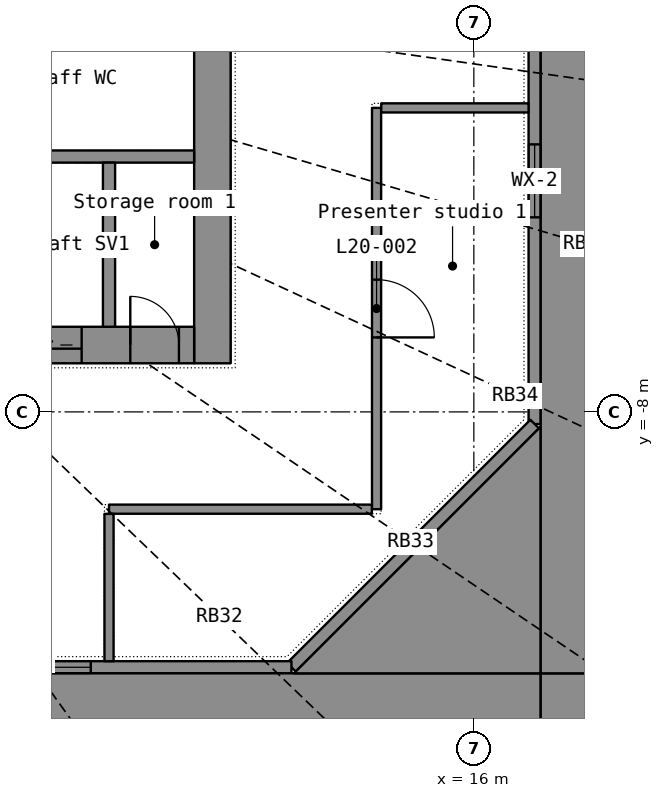
"""IFC4 building model, lengths in metres.
Left out: names, types, materials, properties, quantities, classifications, styles, units other than length and angle.
Written with IfcOpenShell. Run it as: python <this file> out.ifc"""

import sys

from ifc_helpers import new_model, si_unit, direction, frame, frame_2d, origin, place, context, subcontext, project, spatial, polyline, rectangle, outline, extrude, element, fill, save


model = new_model("IFC4")
c1 = context("Model", 3, precision=1e-05, world=origin(), true_north=direction((0.0, 1.0)))
c2 = subcontext(c1, "Body", "Model", "MODEL_VIEW")
j1 = project(units=[si_unit("LENGTHUNIT", "METRE"), si_unit("PLANEANGLEUNIT", "RADIAN")], contexts=[c1])
p1 = place(None, origin())
s1 = spatial("IfcSite", under=j1, at=p1, CompositionType="ELEMENT")
p2 = place(p1, origin())
s2 = spatial("IfcBuilding", under=s1, at=p2, CompositionType="ELEMENT")
p3 = place(p2, frame((0.0, 0.0, 85.2)))
s3 = spatial("IfcBuildingStorey", under=s2, at=p3, CompositionType="ELEMENT", Elevation=85.2)
p4 = place(p3, frame((17.0, 8.2, 0.08), z_axis=(0.0, 0.0, 1.0), x_axis=(0.0, -1.0, 0.0)))
e1 = element("IfcWall", 1, at=p4, inside=s3, PredefinedType="STANDARD", context=c2, shape_type="SweptSolid", body=[
    extrude(rectangle(XDim=16.4, YDim=0.2, at=frame_2d((8.2, 0.0))), origin(), (0.0, 0.0, 1.0), 7.12),
])
p5 = place(p4, frame((7.3, 0.0, 0.0)))
e2 = element("IfcOpeningElement", 2, at=p5, cuts=e1, PredefinedType="OPENING", context=c2, shape_type="SweptSolid", body=[
    extrude(rectangle(XDim=1.8, YDim=2.4, at=frame_2d((0.9, 1.2))), frame((0.0, 0.11, 0.0), z_axis=(0.0, -1.0, 0.0), x_axis=(1.0, 0.0, 0.0)), (0.0, 0.0, 1.0), 0.22),
])
p6 = place(p4, frame((3.4, 0.0, 0.1)))
e3 = element("IfcOpeningElement", 3, at=p6, cuts=e1, PredefinedType="OPENING", context=c2, shape_type="SweptSolid", body=[
    extrude(rectangle(XDim=1.2, YDim=2.2, at=frame_2d((0.6, 1.1))), frame((0.0, 0.11, 0.0), z_axis=(0.0, -1.0, 0.0), x_axis=(1.0, 0.0, 0.0)), (0.0, 0.0, 1.0), 0.22),
])
p7 = place(p4, frame((11.8, 0.0, 0.1)))
e4 = element("IfcOpeningElement", 4, at=p7, cuts=e1, PredefinedType="OPENING", context=c2, shape_type="SweptSolid", body=[
    extrude(rectangle(XDim=1.2, YDim=2.2, at=frame_2d((0.6, 1.1))), frame((0.0, 0.11, 0.0), z_axis=(0.0, -1.0, 0.0), x_axis=(1.0, 0.0, 0.0)), (0.0, 0.0, 1.0), 0.22),
])
p8 = place(p3, frame((17.0, -8.2, 0.08), z_axis=(0.0, 0.0, 1.0), x_axis=(-0.707106781, -0.707106781, 0.0)))
e5 = element("IfcWall", 5, at=p8, inside=s3, PredefinedType="STANDARD", context=c2, shape_type="SweptSolid", body=[
    extrude(rectangle(XDim=5.657, YDim=0.2, at=frame_2d((2.828, 0.0))), origin(), (0.0, 0.0, 1.0), 7.12),
])
p9 = place(p3, frame((13.0, -12.2, 0.08), z_axis=(0.0, 0.0, 1.0), x_axis=(-1.0, 0.0, 0.0)))
e6 = element("IfcWall", 6, at=p9, inside=s3, PredefinedType="STANDARD", context=c2, shape_type="SweptSolid", body=[
    extrude(rectangle(XDim=26.0, YDim=0.2, at=frame_2d((13.0, 0.0))), origin(), (0.0, 0.0, 1.0), 7.12),
])
p10 = place(p9, frame((7.1, 0.0, 0.0)))
e7 = element("IfcOpeningElement", 7, at=p10, cuts=e6, PredefinedType="OPENING", context=c2, shape_type="SweptSolid", body=[
    extrude(rectangle(XDim=1.8, YDim=2.4, at=frame_2d((0.9, 1.2))), frame((0.0, 0.11, 0.0), z_axis=(0.0, -1.0, 0.0), x_axis=(1.0, 0.0, 0.0)), (0.0, 0.0, 1.0), 0.22),
])
p11 = place(p9, frame((17.1, 0.0, 0.0)))
e8 = element("IfcOpeningElement", 8, at=p11, cuts=e6, PredefinedType="OPENING", context=c2, shape_type="SweptSolid", body=[
    extrude(rectangle(XDim=1.8, YDim=2.4, at=frame_2d((0.9, 1.2))), frame((0.0, 0.11, 0.0), z_axis=(0.0, -1.0, 0.0), x_axis=(1.0, 0.0, 0.0)), (0.0, 0.0, 1.0), 0.22),
])
p12 = place(p9, frame((3.3, 0.0, 0.9)))
e9 = element("IfcOpeningElement", 9, at=p12, cuts=e6, PredefinedType="OPENING", context=c2, shape_type="SweptSolid", body=[
    extrude(rectangle(XDim=2.4, YDim=1.5, at=frame_2d((1.2, 0.75))), frame((0.0, 0.11, 0.0), z_axis=(0.0, -1.0, 0.0), x_axis=(1.0, 0.0, 0.0)), (0.0, 0.0, 1.0), 0.22),
])
p13 = place(p9, frame((11.8, 0.0, 0.9)))
e10 = element("IfcOpeningElement", 10, at=p13, cuts=e6, PredefinedType="OPENING", context=c2, shape_type="SweptSolid", body=[
    extrude(rectangle(XDim=2.4, YDim=1.5, at=frame_2d((1.2, 0.75))), frame((0.0, 0.11, 0.0), z_axis=(0.0, -1.0, 0.0), x_axis=(1.0, 0.0, 0.0)), (0.0, 0.0, 1.0), 0.22),
])
p14 = place(p9, frame((20.3, 0.0, 0.9)))
e11 = element("IfcOpeningElement", 11, at=p14, cuts=e6, PredefinedType="OPENING", context=c2, shape_type="SweptSolid", body=[
    extrude(rectangle(XDim=2.4, YDim=1.5, at=frame_2d((1.2, 0.75))), frame((0.0, 0.11, 0.0), z_axis=(0.0, -1.0, 0.0), x_axis=(1.0, 0.0, 0.0)), (0.0, 0.0, 1.0), 0.22),
])
p15 = place(p9, frame((6.5, 0.0, 3.2)))
e12 = element("IfcOpeningElement", 12, at=p15, cuts=e6, PredefinedType="OPENING", context=c2, shape_type="SweptSolid", body=[
    extrude(rectangle(XDim=3.0, YDim=1.0, at=frame_2d((1.5, 0.5))), frame((0.0, 0.11, 0.0), z_axis=(0.0, -1.0, 0.0), x_axis=(1.0, 0.0, 0.0)), (0.0, 0.0, 1.0), 0.22),
])
p16 = place(p9, frame((16.5, 0.0, 3.2)))
e13 = element("IfcOpeningElement", 13, at=p16, cuts=e6, PredefinedType="OPENING", context=c2, shape_type="SweptSolid", body=[
    extrude(rectangle(XDim=3.0, YDim=1.0, at=frame_2d((1.5, 0.5))), frame((0.0, 0.11, 0.0), z_axis=(0.0, -1.0, 0.0), x_axis=(1.0, 0.0, 0.0)), (0.0, 0.0, 1.0), 0.22),
])
p17 = place(p3, frame((0.0, 0.0, -0.4)))
e14 = element("IfcWall", 14, at=p17, inside=s3, PredefinedType="ELEMENTEDWALL", context=c2, shape_type="SweptSolid", body=[
    extrude(outline(polyline([(17.1, -15.177), (17.1, -12.3), (13.042, -12.3), (5.9, -12.3), (5.9, -20.0), (6.569, -19.879), (8.017, -19.509), (8.017, -18.853), (9.717, -18.853), (9.717, -18.991), (10.726, -18.652), (11.726, -18.23), (11.726, -16.77), (13.927, -16.77), (13.927, -17.184), (14.557, -16.859), (15.791, -16.091), (15.791, -15.177), (17.1, -15.177)])), origin(), (0.0, 0.0, 1.0), 1.58),
])
p18 = place(p3, frame((0.0, 0.0, -0.4)))
e15 = element("IfcWall", 15, at=p18, inside=s3, PredefinedType="ELEMENTEDWALL", context=c2, shape_type="SweptSolid", body=[
    extrude(outline(polyline([(20.321, -12.3), (17.1, -12.3), (17.1, -15.177), (17.105, -15.177), (17.946, -14.553), (18.963, -13.653), (18.963, -12.579), (20.056, -12.579), (20.321, -12.3)])), origin(), (0.0, 0.0, 1.0), 1.58),
])
p19 = place(p3, frame((0.0, 0.0, -0.4)))
e16 = element("IfcWall", 16, at=p19, inside=s3, PredefinedType="ELEMENTEDWALL", context=c2, shape_type="SweptSolid", body=[
    extrude(outline(polyline([(13.042, -12.3), (17.1, -12.3), (17.1, -8.241), (13.042, -12.3)])), origin(), (0.0, 0.0, 1.0), 1.58),
])
p20 = place(p3, frame((0.0, 0.0, -0.4)))
e17 = element("IfcWall", 17, at=p20, inside=s3, PredefinedType="ELEMENTEDWALL", context=c2, shape_type="SweptSolid", body=[
    extrude(outline(polyline([(24.515, -5.327), (24.75, -4.464), (24.557, -4.464), (24.557, -2.764), (25.125, -2.764), (25.283, -1.794), (25.32, -1.1), (24.393, -1.1), (24.393, -0.9), (17.1, -0.9), (17.1, -8.241), (17.1, -12.3), (20.321, -12.3), (20.79, -11.804), (21.14, -11.358), (21.031, -11.358), (21.031, -9.158), (22.706, -9.158), (23.001, -8.698), (23.409, -7.901), (23.409, -6.275), (24.146, -6.275), (24.515, -5.327)])), origin(), (0.0, 0.0, 1.0), 1.58),
])
p21 = place(p3, frame((11.7, -7.2, 0.0), z_axis=(0.0, 0.0, 1.0), x_axis=(0.0, 1.0, 0.0)))
e18 = element("IfcWall", 18, at=p21, inside=s3, PredefinedType="SHEAR", context=c2, shape_type="SweptSolid", body=[
    extrude(rectangle(XDim=14.4, YDim=0.6, at=frame_2d((7.2, 0.0))), origin(), (0.0, 0.0, 1.0), 7.0),
])
p22 = place(p21, frame((6.5, 0.0, 0.0)))
e19 = element("IfcOpeningElement", 19, at=p22, cuts=e18, PredefinedType="OPENING", context=c2, shape_type="SweptSolid", body=[
    extrude(rectangle(XDim=1.4, YDim=2.2, at=frame_2d((0.7, 1.1))), frame((0.0, 0.31, 0.0), z_axis=(0.0, -1.0, 0.0), x_axis=(1.0, 0.0, 0.0)), (0.0, 0.0, 1.0), 0.62),
])
p23 = place(p3, frame((-11.4, -6.9, 0.0), z_axis=(0.0, 0.0, 1.0), x_axis=(1.0, 0.0, 0.0)))
e20 = element("IfcWall", 20, at=p23, inside=s3, PredefinedType="SHEAR", context=c2, shape_type="SweptSolid", body=[
    extrude(rectangle(XDim=22.8, YDim=0.6, at=frame_2d((11.4, 0.0))), origin(), (0.0, 0.0, 1.0), 7.0),
])
p24 = place(p23, frame((1.85, 0.0, 0.0)))
e21 = element("IfcOpeningElement", 21, at=p24, cuts=e20, PredefinedType="OPENING", context=c2, shape_type="SweptSolid", body=[
    extrude(rectangle(XDim=1.1, YDim=2.2, at=frame_2d((0.55, 1.1))), frame((0.0, 0.31, 0.0), z_axis=(0.0, -1.0, 0.0), x_axis=(1.0, 0.0, 0.0)), (0.0, 0.0, 1.0), 0.62),
])
p25 = place(p23, frame((3.85, 0.0, 0.0)))
e22 = element("IfcOpeningElement", 22, at=p25, cuts=e20, PredefinedType="OPENING", context=c2, shape_type="SweptSolid", body=[
    extrude(rectangle(XDim=1.1, YDim=2.2, at=frame_2d((0.55, 1.1))), frame((0.0, 0.31, 0.0), z_axis=(0.0, -1.0, 0.0), x_axis=(1.0, 0.0, 0.0)), (0.0, 0.0, 1.0), 0.62),
])
p26 = place(p23, frame((5.85, 0.0, 0.0)))
e23 = element("IfcOpeningElement", 23, at=p26, cuts=e20, PredefinedType="OPENING", context=c2, shape_type="SweptSolid", body=[
    extrude(rectangle(XDim=1.1, YDim=2.2, at=frame_2d((0.55, 1.1))), frame((0.0, 0.31, 0.0), z_axis=(0.0, -1.0, 0.0), x_axis=(1.0, 0.0, 0.0)), (0.0, 0.0, 1.0), 0.62),
])
p27 = place(p23, frame((7.85, 0.0, 0.0)))
e24 = element("IfcOpeningElement", 24, at=p27, cuts=e20, PredefinedType="OPENING", context=c2, shape_type="SweptSolid", body=[
    extrude(rectangle(XDim=1.1, YDim=2.2, at=frame_2d((0.55, 1.1))), frame((0.0, 0.31, 0.0), z_axis=(0.0, -1.0, 0.0), x_axis=(1.0, 0.0, 0.0)), (0.0, 0.0, 1.0), 0.62),
])
p28 = place(p23, frame((9.85, 0.0, 0.0)))
e25 = element("IfcOpeningElement", 25, at=p28, cuts=e20, PredefinedType="OPENING", context=c2, shape_type="SweptSolid", body=[
    extrude(rectangle(XDim=1.1, YDim=2.2, at=frame_2d((0.55, 1.1))), frame((0.0, 0.31, 0.0), z_axis=(0.0, -1.0, 0.0), x_axis=(1.0, 0.0, 0.0)), (0.0, 0.0, 1.0), 0.62),
])
p29 = place(p23, frame((11.85, 0.0, 0.0)))
e26 = element("IfcOpeningElement", 26, at=p29, cuts=e20, PredefinedType="OPENING", context=c2, shape_type="SweptSolid", body=[
    extrude(rectangle(XDim=1.1, YDim=2.2, at=frame_2d((0.55, 1.1))), frame((0.0, 0.31, 0.0), z_axis=(0.0, -1.0, 0.0), x_axis=(1.0, 0.0, 0.0)), (0.0, 0.0, 1.0), 0.62),
])
p30 = place(p23, frame((13.85, 0.0, 0.0)))
e27 = element("IfcOpeningElement", 27, at=p30, cuts=e20, PredefinedType="OPENING", context=c2, shape_type="SweptSolid", body=[
    extrude(rectangle(XDim=1.1, YDim=2.2, at=frame_2d((0.55, 1.1))), frame((0.0, 0.31, 0.0), z_axis=(0.0, -1.0, 0.0), x_axis=(1.0, 0.0, 0.0)), (0.0, 0.0, 1.0), 0.62),
])
p31 = place(p23, frame((15.85, 0.0, 0.0)))
e28 = element("IfcOpeningElement", 28, at=p31, cuts=e20, PredefinedType="OPENING", context=c2, shape_type="SweptSolid", body=[
    extrude(rectangle(XDim=1.1, YDim=2.2, at=frame_2d((0.55, 1.1))), frame((0.0, 0.31, 0.0), z_axis=(0.0, -1.0, 0.0), x_axis=(1.0, 0.0, 0.0)), (0.0, 0.0, 1.0), 0.62),
])
p32 = place(p23, frame((19.85, 0.0, 0.0)))
e29 = element("IfcOpeningElement", 29, at=p32, cuts=e20, PredefinedType="OPENING", context=c2, shape_type="SweptSolid", body=[
    extrude(rectangle(XDim=1.1, YDim=2.2, at=frame_2d((0.55, 1.1))), frame((0.0, 0.31, 0.0), z_axis=(0.0, -1.0, 0.0), x_axis=(1.0, 0.0, 0.0)), (0.0, 0.0, 1.0), 0.62),
])
p33 = place(p23, frame((0.25, 0.0, 0.0)))
e30 = element("IfcOpeningElement", 30, at=p33, cuts=e20, PredefinedType="OPENING", context=c2, shape_type="SweptSolid", body=[
    extrude(rectangle(XDim=0.8, YDim=2.05, at=frame_2d((0.4, 1.025))), frame((0.0, 0.31, 0.0), z_axis=(0.0, -1.0, 0.0), x_axis=(1.0, 0.0, 0.0)), (0.0, 0.0, 1.0), 0.62),
])
p34 = place(p23, frame((21.75, 0.0, 0.0)))
e31 = element("IfcOpeningElement", 31, at=p34, cuts=e20, PredefinedType="OPENING", context=c2, shape_type="SweptSolid", body=[
    extrude(rectangle(XDim=0.8, YDim=2.05, at=frame_2d((0.4, 1.025))), frame((0.0, 0.31, 0.0), z_axis=(0.0, -1.0, 0.0), x_axis=(1.0, 0.0, 0.0)), (0.0, 0.0, 1.0), 0.62),
])
p35 = place(p3, frame((-11.4, -3.8, 0.0), z_axis=(0.0, 0.0, 1.0), x_axis=(1.0, 0.0, 0.0)))
e32 = element("IfcWall", 32, at=p35, inside=s3, PredefinedType="SHEAR", context=c2, shape_type="SweptSolid", body=[
    extrude(rectangle(XDim=22.8, YDim=0.2, at=frame_2d((11.4, 0.0))), origin(), (0.0, 0.0, 1.0), 7.0),
])
p36 = place(p3, frame((10.0, -6.6, 0.0), z_axis=(0.0, 0.0, 1.0), x_axis=(0.0, 1.0, 0.0)))
e33 = element("IfcWall", 33, at=p36, inside=s3, PredefinedType="SHEAR", context=c2, shape_type="SweptSolid", body=[
    extrude(rectangle(XDim=2.7, YDim=0.2, at=frame_2d((1.35, 0.0))), origin(), (0.0, 0.0, 1.0), 7.0),
])
p37 = place(p3, frame((14.4, -3.0, 0.0), z_axis=(0.0, 0.0, 1.0), x_axis=(0.0, -1.0, 0.0)))
e34 = element("IfcWall", 34, at=p37, inside=s3, PredefinedType="PARTITIONING", context=c2, shape_type="SweptSolid", body=[
    extrude(rectangle(XDim=6.6, YDim=0.15, at=frame_2d((3.3, 0.0))), origin(), (0.0, 0.0, 1.0), 6.1),
])
p38 = place(p37, frame((2.825, 0.0, 0.0)))
e35 = element("IfcOpeningElement", 35, at=p38, cuts=e34, PredefinedType="OPENING", context=c2, shape_type="SweptSolid", body=[
    extrude(rectangle(XDim=0.95, YDim=2.15, at=frame_2d((0.475, 1.075))), frame((0.0, 0.085, 0.0), z_axis=(0.0, -1.0, 0.0), x_axis=(1.0, 0.0, 0.0)), (0.0, 0.0, 1.0), 0.17),
])
p39 = place(p3, frame((14.323, -9.6, 0.0), z_axis=(0.0, 0.0, 1.0), x_axis=(-1.0, 0.0, 0.0)))
e36 = element("IfcWall", 36, at=p39, inside=s3, PredefinedType="PARTITIONING", context=c2, shape_type="SweptSolid", body=[
    extrude(rectangle(XDim=4.323, YDim=0.15, at=frame_2d((2.162, 0.0))), origin(), (0.0, 0.0, 1.0), 6.1),
])
p40 = place(p3, frame((10.0, -9.677, 0.0), z_axis=(0.0, 0.0, 1.0), x_axis=(0.0, -1.0, 0.0)))
e37 = element("IfcWall", 37, at=p40, inside=s3, PredefinedType="PARTITIONING", context=c2, shape_type="SweptSolid", body=[
    extrude(rectangle(XDim=2.423, YDim=0.15, at=frame_2d((1.211, 0.0))), origin(), (0.0, 0.0, 1.0), 6.1),
])
p41 = place(p3, frame((16.9, -3.0, 0.0), z_axis=(0.0, 0.0, 1.0), x_axis=(-1.0, 0.0, 0.0)))
e38 = element("IfcWall", 38, at=p41, inside=s3, PredefinedType="PARTITIONING", context=c2, shape_type="SweptSolid", body=[
    extrude(rectangle(XDim=2.423, YDim=0.15, at=frame_2d((1.211, 0.0))), origin(), (0.0, 0.0, 1.0), 6.1),
])
p42 = place(p7, origin())
e39 = element("IfcWindow", 39, at=p42, inside=s3, PartitioningType="SINGLE_PANEL", PredefinedType="WINDOW", context=c2, shape_type="SweptSolid", body=[
    extrude(rectangle(XDim=1.2, YDim=2.2, at=frame_2d((0.6, 1.1))), frame((0.0, 0.03, 0.0), z_axis=(0.0, -1.0, 0.0), x_axis=(1.0, 0.0, 0.0)), (0.0, 0.0, 1.0), 0.06),
])
fill(e4, e39)
p43 = place(p12, origin())
e40 = element("IfcWindow", 40, at=p43, inside=s3, PartitioningType="SINGLE_PANEL", PredefinedType="WINDOW", context=c2, shape_type="SweptSolid", body=[
    extrude(rectangle(XDim=2.4, YDim=1.5, at=frame_2d((1.2, 0.75))), frame((0.0, 0.03, 0.0), z_axis=(0.0, -1.0, 0.0), x_axis=(1.0, 0.0, 0.0)), (0.0, 0.0, 1.0), 0.06),
])
fill(e9, e40)
p44 = place(p32, origin())
e41 = element("IfcDoor", 41, at=p44, inside=s3, OperationType="DOUBLE_DOOR_SLIDING", PredefinedType="DOOR", context=c2, shape_type="SweptSolid", body=[
    extrude(rectangle(XDim=1.1, YDim=2.2, at=frame_2d((0.55, 1.1))), frame((0.0, 0.025, 0.0), z_axis=(0.0, -1.0, 0.0), x_axis=(1.0, 0.0, 0.0)), (0.0, 0.0, 1.0), 0.05),
])
fill(e29, e41)
p45 = place(p34, origin())
e42 = element("IfcDoor", 42, at=p45, inside=s3, OperationType="SINGLE_SWING_LEFT", PredefinedType="DOOR", context=c2, shape_type="SweptSolid", body=[
    extrude(rectangle(XDim=0.8, YDim=2.05, at=frame_2d((0.4, 1.025))), frame((0.0, 0.025, 0.0), z_axis=(0.0, -1.0, 0.0), x_axis=(1.0, 0.0, 0.0)), (0.0, 0.0, 1.0), 0.05),
])
fill(e31, e42)
p46 = place(p38, origin())
e43 = element("IfcDoor", 43, at=p46, inside=s3, OperationType="SINGLE_SWING_RIGHT", PredefinedType="DOOR", context=c2, shape_type="SweptSolid", body=[
    extrude(rectangle(XDim=0.95, YDim=2.15, at=frame_2d((0.475, 1.075))), frame((0.0, 0.025, 0.0), z_axis=(0.0, -1.0, 0.0), x_axis=(1.0, 0.0, 0.0)), (0.0, 0.0, 1.0), 0.05),
])
fill(e35, e43)
save(model, sys.argv[1])
